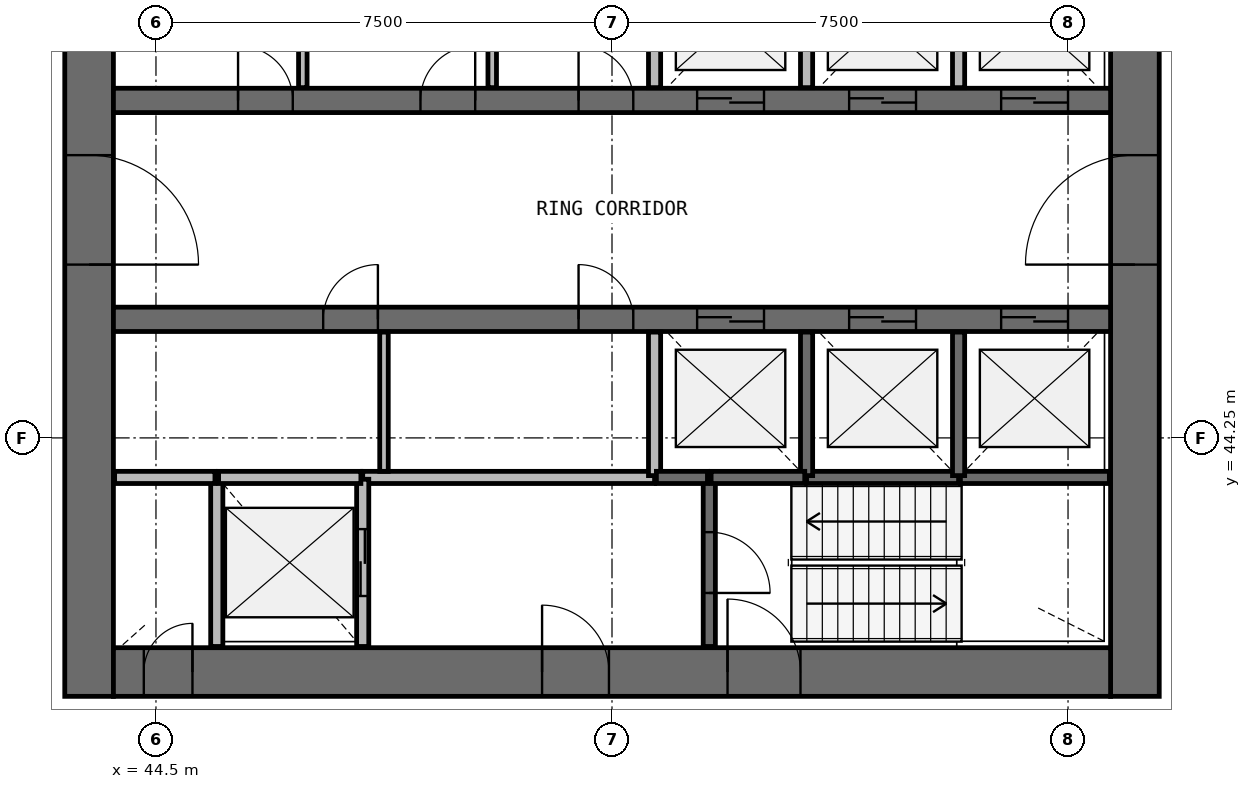
"""IFC4 building model, lengths in metres.
Left out: names, types, materials, properties, quantities, classifications, styles, units other than length and angle.
Written with IfcOpenShell. Run it as: python <this file> out.ifc"""

import sys

from ifc_helpers import new_model, si_unit, direction, frame, frame_2d, origin, place, context, subcontext, project, spatial, rectangle, extrude, source, transform, mapped, element, fill, save


model = new_model("IFC4")
c1 = context("Model", 3, precision=1e-05, world=origin(), true_north=direction((0.0, 1.0)))
c2 = subcontext(c1, "Body", "Model", "MODEL_VIEW")
j1 = project(units=[si_unit("LENGTHUNIT", "METRE"), si_unit("PLANEANGLEUNIT", "RADIAN")], contexts=[c1])
p1 = place(None, origin())
s1 = spatial("IfcSite", under=j1, at=p1, CompositionType="ELEMENT")
p2 = place(p1, origin())
s2 = spatial("IfcBuilding", under=s1, at=p2, CompositionType="ELEMENT")
p3 = place(p2, frame((0.0, 0.0, 148.7)))
s3 = spatial("IfcBuildingStorey", under=s2, at=p3, CompositionType="ELEMENT", Elevation=148.7)
p4 = place(p3, frame((60.6, 40.0, 0.0), z_axis=(0.0, 0.0, 1.0), x_axis=(0.0, 1.0, 0.0)))
e1 = element("IfcWall", 1, at=p4, inside=s3, PredefinedType="SHEAR", context=c2, shape_type="SweptSolid", body=[
    extrude(rectangle(XDim=16.0, YDim=0.8, at=frame_2d((8.0, 0.0))), origin(), (0.0, 0.0, 1.0), 3.9),
])
p5 = place(p4, frame((7.1, 0.0, 0.0)))
e2 = element("IfcOpeningElement", 2, at=p5, cuts=e1, PredefinedType="OPENING", context=c2, shape_type="SweptSolid", body=[
    extrude(rectangle(XDim=1.8, YDim=2.1, at=frame_2d((0.9, 1.05))), frame((0.0, 0.41, 0.0), z_axis=(0.0, -1.0, 0.0), x_axis=(1.0, 0.0, 0.0)), (0.0, 0.0, 1.0), 0.82),
])
p6 = place(p3, frame((43.4, 56.0, 0.0), z_axis=(0.0, 0.0, 1.0), x_axis=(0.0, -1.0, 0.0)))
e3 = element("IfcWall", 3, at=p6, inside=s3, PredefinedType="SHEAR", context=c2, shape_type="SweptSolid", body=[
    extrude(rectangle(XDim=16.0, YDim=0.8, at=frame_2d((8.0, 0.0))), origin(), (0.0, 0.0, 1.0), 3.9),
])
p7 = place(p6, frame((7.1, 0.0, 0.0)))
e4 = element("IfcOpeningElement", 4, at=p7, cuts=e3, PredefinedType="OPENING", context=c2, shape_type="SweptSolid", body=[
    extrude(rectangle(XDim=1.8, YDim=2.1, at=frame_2d((0.9, 1.05))), frame((0.0, 0.41, 0.0), z_axis=(0.0, -1.0, 0.0), x_axis=(1.0, 0.0, 0.0)), (0.0, 0.0, 1.0), 0.82),
])
p8 = place(p3, frame((43.8, 40.4, 0.0), z_axis=(0.0, 0.0, 1.0), x_axis=(1.0, 0.0, 0.0)))
e5 = element("IfcWall", 5, at=p8, inside=s3, PredefinedType="SHEAR", context=c2, shape_type="SweptSolid", body=[
    extrude(rectangle(XDim=16.4, YDim=0.8, at=frame_2d((8.2, 0.0))), origin(), (0.0, 0.0, 1.0), 3.9),
])
p9 = place(p8, frame((10.1, 0.0, 0.0)))
e6 = element("IfcOpeningElement", 6, at=p9, cuts=e5, PredefinedType="OPENING", context=c2, shape_type="SweptSolid", body=[
    extrude(rectangle(XDim=1.2, YDim=2.1, at=frame_2d((0.6, 1.05))), frame((0.0, 0.41, 0.0), z_axis=(0.0, -1.0, 0.0), x_axis=(1.0, 0.0, 0.0)), (0.0, 0.0, 1.0), 0.82),
])
p10 = place(p8, frame((7.05, 0.0, 0.0)))
e7 = element("IfcOpeningElement", 7, at=p10, cuts=e5, PredefinedType="OPENING", context=c2, shape_type="SweptSolid", body=[
    extrude(rectangle(XDim=1.1, YDim=2.1, at=frame_2d((0.55, 1.05))), frame((0.0, 0.41, 0.0), z_axis=(0.0, -1.0, 0.0), x_axis=(1.0, 0.0, 0.0)), (0.0, 0.0, 1.0), 0.82),
])
p11 = place(p8, frame((0.5, 0.0, 0.0)))
e8 = element("IfcOpeningElement", 8, at=p11, cuts=e5, PredefinedType="OPENING", context=c2, shape_type="SweptSolid", body=[
    extrude(rectangle(XDim=0.8, YDim=2.1, at=frame_2d((0.4, 1.05))), frame((0.0, 0.41, 0.0), z_axis=(0.0, -1.0, 0.0), x_axis=(1.0, 0.0, 0.0)), (0.0, 0.0, 1.0), 0.82),
])
p12 = place(p3, frame((43.8, 49.8, 0.0), z_axis=(0.0, 0.0, 1.0), x_axis=(1.0, 0.0, 0.0)))
e9 = element("IfcWall", 9, at=p12, inside=s3, PredefinedType="SHEAR", context=c2, shape_type="SweptSolid", body=[
    extrude(rectangle(XDim=16.4, YDim=0.4, at=frame_2d((8.2, 0.0))), origin(), (0.0, 0.0, 1.0), 3.9),
])
p13 = place(p12, frame((9.6, 0.0, 0.0)))
e10 = element("IfcOpeningElement", 10, at=p13, cuts=e9, PredefinedType="OPENING", context=c2, shape_type="SweptSolid", body=[
    extrude(rectangle(XDim=1.1, YDim=2.1, at=frame_2d((0.55, 1.05))), frame((0.0, 0.21, 0.0), z_axis=(0.0, -1.0, 0.0), x_axis=(1.0, 0.0, 0.0)), (0.0, 0.0, 1.0), 0.42),
])
p14 = place(p12, frame((12.1, 0.0, 0.0)))
e11 = element("IfcOpeningElement", 11, at=p14, cuts=e9, PredefinedType="OPENING", context=c2, shape_type="SweptSolid", body=[
    extrude(rectangle(XDim=1.1, YDim=2.1, at=frame_2d((0.55, 1.05))), frame((0.0, 0.21, 0.0), z_axis=(0.0, -1.0, 0.0), x_axis=(1.0, 0.0, 0.0)), (0.0, 0.0, 1.0), 0.42),
])
p15 = place(p12, frame((14.6, 0.0, 0.0)))
e12 = element("IfcOpeningElement", 12, at=p15, cuts=e9, PredefinedType="OPENING", context=c2, shape_type="SweptSolid", body=[
    extrude(rectangle(XDim=1.1, YDim=2.1, at=frame_2d((0.55, 1.05))), frame((0.0, 0.21, 0.0), z_axis=(0.0, -1.0, 0.0), x_axis=(1.0, 0.0, 0.0)), (0.0, 0.0, 1.0), 0.42),
])
p16 = place(p12, frame((2.05, 0.0, 0.0)))
e13 = element("IfcOpeningElement", 13, at=p16, cuts=e9, PredefinedType="OPENING", context=c2, shape_type="SweptSolid", body=[
    extrude(rectangle(XDim=0.9, YDim=2.1, at=frame_2d((0.45, 1.05))), frame((0.0, 0.21, 0.0), z_axis=(0.0, -1.0, 0.0), x_axis=(1.0, 0.0, 0.0)), (0.0, 0.0, 1.0), 0.42),
])
p17 = place(p12, frame((5.05, 0.0, 0.0)))
e14 = element("IfcOpeningElement", 14, at=p17, cuts=e9, PredefinedType="OPENING", context=c2, shape_type="SweptSolid", body=[
    extrude(rectangle(XDim=0.9, YDim=2.1, at=frame_2d((0.45, 1.05))), frame((0.0, 0.21, 0.0), z_axis=(0.0, -1.0, 0.0), x_axis=(1.0, 0.0, 0.0)), (0.0, 0.0, 1.0), 0.42),
])
p18 = place(p12, frame((7.65, 0.0, 0.0)))
e15 = element("IfcOpeningElement", 15, at=p18, cuts=e9, PredefinedType="OPENING", context=c2, shape_type="SweptSolid", body=[
    extrude(rectangle(XDim=0.9, YDim=2.1, at=frame_2d((0.45, 1.05))), frame((0.0, 0.21, 0.0), z_axis=(0.0, -1.0, 0.0), x_axis=(1.0, 0.0, 0.0)), (0.0, 0.0, 1.0), 0.42),
])
p19 = place(p3, frame((43.8, 46.2, 0.0), z_axis=(0.0, 0.0, 1.0), x_axis=(1.0, 0.0, 0.0)))
e16 = element("IfcWall", 16, at=p19, inside=s3, PredefinedType="SHEAR", context=c2, shape_type="SweptSolid", body=[
    extrude(rectangle(XDim=16.4, YDim=0.4, at=frame_2d((8.2, 0.0))), origin(), (0.0, 0.0, 1.0), 3.9),
])
p20 = place(p19, frame((9.6, 0.0, 0.0)))
e17 = element("IfcOpeningElement", 17, at=p20, cuts=e16, PredefinedType="OPENING", context=c2, shape_type="SweptSolid", body=[
    extrude(rectangle(XDim=1.1, YDim=2.1, at=frame_2d((0.55, 1.05))), frame((0.0, 0.21, 0.0), z_axis=(0.0, -1.0, 0.0), x_axis=(1.0, 0.0, 0.0)), (0.0, 0.0, 1.0), 0.42),
])
p21 = place(p19, frame((12.1, 0.0, 0.0)))
e18 = element("IfcOpeningElement", 18, at=p21, cuts=e16, PredefinedType="OPENING", context=c2, shape_type="SweptSolid", body=[
    extrude(rectangle(XDim=1.1, YDim=2.1, at=frame_2d((0.55, 1.05))), frame((0.0, 0.21, 0.0), z_axis=(0.0, -1.0, 0.0), x_axis=(1.0, 0.0, 0.0)), (0.0, 0.0, 1.0), 0.42),
])
p22 = place(p19, frame((14.6, 0.0, 0.0)))
e19 = element("IfcOpeningElement", 19, at=p22, cuts=e16, PredefinedType="OPENING", context=c2, shape_type="SweptSolid", body=[
    extrude(rectangle(XDim=1.1, YDim=2.1, at=frame_2d((0.55, 1.05))), frame((0.0, 0.21, 0.0), z_axis=(0.0, -1.0, 0.0), x_axis=(1.0, 0.0, 0.0)), (0.0, 0.0, 1.0), 0.42),
])
p23 = place(p19, frame((3.45, 0.0, 0.0)))
e20 = element("IfcOpeningElement", 20, at=p23, cuts=e16, PredefinedType="OPENING", context=c2, shape_type="SweptSolid", body=[
    extrude(rectangle(XDim=0.9, YDim=2.1, at=frame_2d((0.45, 1.05))), frame((0.0, 0.21, 0.0), z_axis=(0.0, -1.0, 0.0), x_axis=(1.0, 0.0, 0.0)), (0.0, 0.0, 1.0), 0.42),
])
p24 = place(p19, frame((7.65, 0.0, 0.0)))
e21 = element("IfcOpeningElement", 21, at=p24, cuts=e16, PredefinedType="OPENING", context=c2, shape_type="SweptSolid", body=[
    extrude(rectangle(XDim=0.9, YDim=2.1, at=frame_2d((0.45, 1.05))), frame((0.0, 0.21, 0.0), z_axis=(0.0, -1.0, 0.0), x_axis=(1.0, 0.0, 0.0)), (0.0, 0.0, 1.0), 0.42),
])
p25 = place(p3, frame((52.7, 43.6, 0.0), z_axis=(0.0, 0.0, 1.0), x_axis=(-1.0, 0.0, 0.0)))
e22 = element("IfcWall", 22, at=p25, inside=s3, PredefinedType="SOLIDWALL", context=c2, shape_type="SweptSolid", body=[
    extrude(rectangle(XDim=4.8, YDim=0.2, at=frame_2d((2.4, 0.0))), origin(), (0.0, 0.0, 1.0), 3.58),
])
p26 = place(p3, frame((45.5, 43.6, 0.0), z_axis=(0.0, 0.0, 1.0), x_axis=(0.0, -1.0, 0.0)))
e23 = element("IfcWall", 23, at=p26, inside=s3, PredefinedType="SOLIDWALL", context=c2, shape_type="SweptSolid", body=[
    extrude(rectangle(XDim=2.78, YDim=0.2, at=frame_2d((1.39, 0.0))), origin(), (0.0, 0.0, 1.0), 3.58),
])
p27 = place(p3, frame((47.9, 40.82, 0.0), z_axis=(0.0, 0.0, 1.0), x_axis=(0.0, 1.0, 0.0)))
e24 = element("IfcWall", 24, at=p27, inside=s3, PredefinedType="SOLIDWALL", context=c2, shape_type="SweptSolid", body=[
    extrude(rectangle(XDim=2.75, YDim=0.2, at=frame_2d((1.375, 0.0))), origin(), (0.0, 0.0, 1.0), 3.58),
])
p28 = place(p27, frame((0.83, 0.0, 0.0)))
e25 = element("IfcOpeningElement", 25, at=p28, cuts=e24, PredefinedType="OPENING", context=c2, shape_type="SweptSolid", body=[
    extrude(rectangle(XDim=1.1, YDim=2.1, at=frame_2d((0.55, 1.05))), frame((0.0, 0.11, 0.0), z_axis=(0.0, -1.0, 0.0), x_axis=(1.0, 0.0, 0.0)), (0.0, 0.0, 1.0), 0.22),
])
p29 = place(p3, frame((53.6, 43.6, 0.0), z_axis=(0.0, 0.0, 1.0), x_axis=(0.0, -1.0, 0.0)))
e26 = element("IfcWall", 26, at=p29, inside=s3, PredefinedType="SOLIDWALL", context=c2, shape_type="SweptSolid", body=[
    extrude(rectangle(XDim=2.78, YDim=0.2, at=frame_2d((1.39, 0.0))), origin(), (0.0, 0.0, 1.0), 3.58),
])
p30 = place(p29, frame((0.9, 0.0, 0.0)))
e27 = element("IfcOpeningElement", 27, at=p30, cuts=e26, PredefinedType="OPENING", context=c2, shape_type="SweptSolid", body=[
    extrude(rectangle(XDim=1.0, YDim=2.1, at=frame_2d((0.5, 1.05))), frame((0.0, 0.11, 0.0), z_axis=(0.0, -1.0, 0.0), x_axis=(1.0, 0.0, 0.0)), (0.0, 0.0, 1.0), 0.22),
])
p31 = place(p3, frame((55.2, 43.6, 0.0), z_axis=(0.0, 0.0, 1.0), x_axis=(1.0, 0.0, 0.0)))
e28 = element("IfcWall", 28, at=p31, inside=s3, PredefinedType="SOLIDWALL", context=c2, shape_type="SweptSolid", body=[
    extrude(rectangle(XDim=2.5, YDim=0.2, at=frame_2d((1.25, 0.0))), origin(), (0.0, 0.0, 1.0), 3.58),
])
p32 = place(p3, frame((57.73, 43.6, 0.0), z_axis=(0.0, 0.0, 1.0), x_axis=(1.0, 0.0, 0.0)))
e29 = element("IfcWall", 29, at=p32, inside=s3, PredefinedType="SOLIDWALL", context=c2, shape_type="SweptSolid", body=[
    extrude(rectangle(XDim=2.45, YDim=0.2, at=frame_2d((1.225, 0.0))), origin(), (0.0, 0.0, 1.0), 3.58),
])
p33 = place(p3, frame((47.87, 43.6, 0.0), z_axis=(0.0, 0.0, 1.0), x_axis=(-1.0, 0.0, 0.0)))
e30 = element("IfcWall", 30, at=p33, inside=s3, PredefinedType="SOLIDWALL", context=c2, shape_type="SweptSolid", body=[
    extrude(rectangle(XDim=2.34, YDim=0.2, at=frame_2d((1.17, 0.0))), origin(), (0.0, 0.0, 1.0), 3.58),
])
for number, where, z_axis, x_axis in (
    (31, (52.7, 45.99, 0.0), (0.0, 0.0, 1.0), (0.0, -1.0, 0.0)),
    (32, (52.7, 52.37, 0.0), (0.0, 0.0, 1.0), (0.0, -1.0, 0.0)),
    (33, (55.2, 43.63, 0.0), (0.0, 0.0, 1.0), (0.0, 1.0, 0.0)),
    (34, (55.2, 50.01, 0.0), (0.0, 0.0, 1.0), (0.0, 1.0, 0.0)),
    (35, (57.7, 43.63, 0.0), (0.0, 0.0, 1.0), (0.0, 1.0, 0.0)),
):
    element("IfcWall", number, at=place(p3, frame(where, z_axis=z_axis, x_axis=x_axis)), inside=s3, PredefinedType="SOLIDWALL", context=c2, shape_type="SweptSolid", body=[
        extrude(rectangle(XDim=2.36, YDim=0.2, at=frame_2d((1.18, 0.0))), origin(), (0.0, 0.0, 1.0), 3.58),
    ])
p34 = place(p3, frame((57.7, 50.01, 0.0), z_axis=(0.0, 0.0, 1.0), x_axis=(0.0, 1.0, 0.0)))
e36 = element("IfcWall", 36, at=p34, inside=s3, PredefinedType="SOLIDWALL", context=c2, shape_type="SweptSolid", body=[
    extrude(rectangle(XDim=2.39, YDim=0.2, at=frame_2d((1.195, 0.0))), origin(), (0.0, 0.0, 1.0), 3.58),
])
p35 = place(p3, frame((45.47, 43.6, 0.0), z_axis=(0.0, 0.0, 1.0), x_axis=(-1.0, 0.0, 0.0)))
e37 = element("IfcWall", 37, at=p35, inside=s3, PredefinedType="SOLIDWALL", context=c2, shape_type="SweptSolid", body=[
    extrude(rectangle(XDim=1.65, YDim=0.2, at=frame_2d((0.825, 0.0))), origin(), (0.0, 0.0, 1.0), 3.58),
])
p36 = place(p3, frame((53.63, 43.6, 0.0), z_axis=(0.0, 0.0, 1.0), x_axis=(1.0, 0.0, 0.0)))
e38 = element("IfcWall", 38, at=p36, inside=s3, PredefinedType="SOLIDWALL", context=c2, shape_type="SweptSolid", body=[
    extrude(rectangle(XDim=1.54, YDim=0.2, at=frame_2d((0.77, 0.0))), origin(), (0.0, 0.0, 1.0), 3.58),
])
p37 = place(p3, frame((52.73, 43.6, 0.0), z_axis=(0.0, 0.0, 1.0), x_axis=(1.0, 0.0, 0.0)))
e39 = element("IfcWall", 39, at=p37, inside=s3, PredefinedType="SOLIDWALL", context=c2, shape_type="SweptSolid", body=[
    extrude(rectangle(XDim=0.84, YDim=0.2, at=frame_2d((0.42, 0.0))), origin(), (0.0, 0.0, 1.0), 3.58),
])
for number, where, z_axis, x_axis in (
    (40, (46.915, 50.01, 0.0), (0.0, 0.0, 1.0), (0.0, 1.0, 0.0)),
    (41, (48.25, 43.7, 0.0), (0.0, 0.0, 1.0), (0.0, 1.0, 0.0)),
    (42, (50.03, 50.01, 0.0), (0.0, 0.0, 1.0), (0.0, 1.0, 0.0)),
):
    element("IfcWall", number, at=place(p3, frame(where, z_axis=z_axis, x_axis=x_axis)), inside=s3, PredefinedType="PARTITIONING", context=c2, shape_type="SweptSolid", body=[
        extrude(rectangle(XDim=2.29, YDim=0.14, at=frame_2d((1.145, 0.0))), origin(), (0.0, 0.0, 1.0), 2.88),
    ])
m1 = source(origin(), c2, "Body", "SweptSolid", [
    extrude(rectangle(XDim=1.8, YDim=2.1, at=frame_2d((0.9, 1.05))), frame((0.0, 0.025, 0.0), z_axis=(0.0, -1.0, 0.0), x_axis=(1.0, 0.0, 0.0)), (0.0, 0.0, 1.0), 0.05),
])
p38 = place(p7, origin())
e43 = element("IfcDoor", 43, at=p38, inside=s3, OperationType="SINGLE_SWING_RIGHT", PredefinedType="DOOR", context=c2, shape_type="MappedRepresentation", body=[
    mapped(m1, transform((0.0, 0.0, 0.0), scale=1.0)),
])
fill(e4, e43)
p39 = place(p5, origin())
e44 = element("IfcDoor", 44, at=p39, inside=s3, OperationType="SINGLE_SWING_LEFT", PredefinedType="DOOR", context=c2, shape_type="MappedRepresentation", body=[
    mapped(m1, transform((0.0, 0.0, 0.0), scale=1.0)),
])
fill(e2, e44)
m2 = source(origin(), c2, "Body", "SweptSolid", [
    extrude(rectangle(XDim=1.1, YDim=2.1, at=frame_2d((0.55, 1.05))), frame((0.0, 0.025, 0.0), z_axis=(0.0, -1.0, 0.0), x_axis=(1.0, 0.0, 0.0)), (0.0, 0.0, 1.0), 0.05),
])
p40 = place(p13, origin())
e45 = element("IfcDoor", 45, at=p40, inside=s3, OperationType="DOUBLE_DOOR_SLIDING", PredefinedType="USERDEFINED", context=c2, shape_type="MappedRepresentation", body=[
    mapped(m2, transform((0.0, 0.0, 0.0), scale=1.0)),
])
fill(e10, e45)
p41 = place(p14, origin())
e46 = element("IfcDoor", 46, at=p41, inside=s3, OperationType="DOUBLE_DOOR_SLIDING", PredefinedType="USERDEFINED", context=c2, shape_type="MappedRepresentation", body=[
    mapped(m2, transform((0.0, 0.0, 0.0), scale=1.0)),
])
fill(e11, e46)
p42 = place(p15, origin())
e47 = element("IfcDoor", 47, at=p42, inside=s3, OperationType="DOUBLE_DOOR_SLIDING", PredefinedType="USERDEFINED", context=c2, shape_type="MappedRepresentation", body=[
    mapped(m2, transform((0.0, 0.0, 0.0), scale=1.0)),
])
fill(e12, e47)
p43 = place(p20, origin())
e48 = element("IfcDoor", 48, at=p43, inside=s3, OperationType="DOUBLE_DOOR_SLIDING", PredefinedType="USERDEFINED", context=c2, shape_type="MappedRepresentation", body=[
    mapped(m2, transform((0.0, 0.0, 0.0), scale=1.0)),
])
fill(e17, e48)
p44 = place(p21, origin())
e49 = element("IfcDoor", 49, at=p44, inside=s3, OperationType="DOUBLE_DOOR_SLIDING", PredefinedType="USERDEFINED", context=c2, shape_type="MappedRepresentation", body=[
    mapped(m2, transform((0.0, 0.0, 0.0), scale=1.0)),
])
fill(e18, e49)
p45 = place(p22, origin())
e50 = element("IfcDoor", 50, at=p45, inside=s3, OperationType="DOUBLE_DOOR_SLIDING", PredefinedType="USERDEFINED", context=c2, shape_type="MappedRepresentation", body=[
    mapped(m2, transform((0.0, 0.0, 0.0), scale=1.0)),
])
fill(e19, e50)
p46 = place(p28, origin())
e51 = element("IfcDoor", 51, at=p46, inside=s3, OperationType="DOUBLE_DOOR_SLIDING", PredefinedType="USERDEFINED", context=c2, shape_type="MappedRepresentation", body=[
    mapped(m2, transform((0.0, 0.0, 0.0), scale=1.0)),
])
fill(e25, e51)
m3 = source(origin(), c2, "Body", "SweptSolid", [
    extrude(rectangle(XDim=1.2, YDim=2.1, at=frame_2d((0.6, 1.05))), frame((0.0, 0.025, 0.0), z_axis=(0.0, -1.0, 0.0), x_axis=(1.0, 0.0, 0.0)), (0.0, 0.0, 1.0), 0.05),
])
p47 = place(p9, origin())
e52 = element("IfcDoor", 52, at=p47, inside=s3, OperationType="SINGLE_SWING_LEFT", PredefinedType="DOOR", context=c2, shape_type="MappedRepresentation", body=[
    mapped(m3, transform((0.0, 0.0, 0.0), scale=1.0)),
])
fill(e6, e52)
m4 = source(origin(), c2, "Body", "SweptSolid", [
    extrude(rectangle(XDim=1.0, YDim=2.1, at=frame_2d((0.5, 1.05))), frame((0.0, 0.025, 0.0), z_axis=(0.0, -1.0, 0.0), x_axis=(1.0, 0.0, 0.0)), (0.0, 0.0, 1.0), 0.05),
])
p48 = place(p30, origin())
e53 = element("IfcDoor", 53, at=p48, inside=s3, OperationType="SINGLE_SWING_RIGHT", PredefinedType="DOOR", context=c2, shape_type="MappedRepresentation", body=[
    mapped(m4, transform((0.0, 0.0, 0.0), scale=1.0)),
])
fill(e27, e53)
m5 = source(origin(), c2, "Body", "SweptSolid", [
    extrude(rectangle(XDim=1.1, YDim=2.1, at=frame_2d((0.55, 1.05))), frame((0.0, 0.025, 0.0), z_axis=(0.0, -1.0, 0.0), x_axis=(1.0, 0.0, 0.0)), (0.0, 0.0, 1.0), 0.05),
])
p49 = place(p10, origin())
e54 = element("IfcDoor", 54, at=p49, inside=s3, OperationType="SINGLE_SWING_LEFT", PredefinedType="DOOR", context=c2, shape_type="MappedRepresentation", body=[
    mapped(m5, transform((0.0, 0.0, 0.0), scale=1.0)),
])
fill(e7, e54)
m6 = source(origin(), c2, "Body", "SweptSolid", [
    extrude(rectangle(XDim=0.8, YDim=2.1, at=frame_2d((0.4, 1.05))), frame((0.0, 0.025, 0.0), z_axis=(0.0, -1.0, 0.0), x_axis=(1.0, 0.0, 0.0)), (0.0, 0.0, 1.0), 0.05),
])
p50 = place(p11, origin())
e55 = element("IfcDoor", 55, at=p50, inside=s3, OperationType="SINGLE_SWING_RIGHT", PredefinedType="DOOR", context=c2, shape_type="MappedRepresentation", body=[
    mapped(m6, transform((0.0, 0.0, 0.0), scale=1.0)),
])
fill(e8, e55)
m7 = source(origin(), c2, "Body", "SweptSolid", [
    extrude(rectangle(XDim=0.9, YDim=2.1, at=frame_2d((0.45, 1.05))), frame((0.0, 0.025, 0.0), z_axis=(0.0, -1.0, 0.0), x_axis=(1.0, 0.0, 0.0)), (0.0, 0.0, 1.0), 0.05),
])
p51 = place(p16, origin())
e56 = element("IfcDoor", 56, at=p51, inside=s3, OperationType="SINGLE_SWING_LEFT", PredefinedType="DOOR", context=c2, shape_type="MappedRepresentation", body=[
    mapped(m7, transform((0.0, 0.0, 0.0), scale=1.0)),
])
fill(e13, e56)
p52 = place(p17, origin())
e57 = element("IfcDoor", 57, at=p52, inside=s3, OperationType="SINGLE_SWING_RIGHT", PredefinedType="DOOR", context=c2, shape_type="MappedRepresentation", body=[
    mapped(m7, transform((0.0, 0.0, 0.0), scale=1.0)),
])
fill(e14, e57)
p53 = place(p18, origin())
e58 = element("IfcDoor", 58, at=p53, inside=s3, OperationType="SINGLE_SWING_LEFT", PredefinedType="DOOR", context=c2, shape_type="MappedRepresentation", body=[
    mapped(m7, transform((0.0, 0.0, 0.0), scale=1.0)),
])
fill(e15, e58)
p54 = place(p23, origin())
e59 = element("IfcDoor", 59, at=p54, inside=s3, OperationType="SINGLE_SWING_RIGHT", PredefinedType="DOOR", context=c2, shape_type="MappedRepresentation", body=[
    mapped(m7, transform((0.0, 0.0, 0.0), scale=1.0)),
])
fill(e20, e59)
p55 = place(p24, origin())
e60 = element("IfcDoor", 60, at=p55, inside=s3, OperationType="SINGLE_SWING_LEFT", PredefinedType="DOOR", context=c2, shape_type="MappedRepresentation", body=[
    mapped(m7, transform((0.0, 0.0, 0.0), scale=1.0)),
])
fill(e21, e60)
save(model, sys.argv[1])
